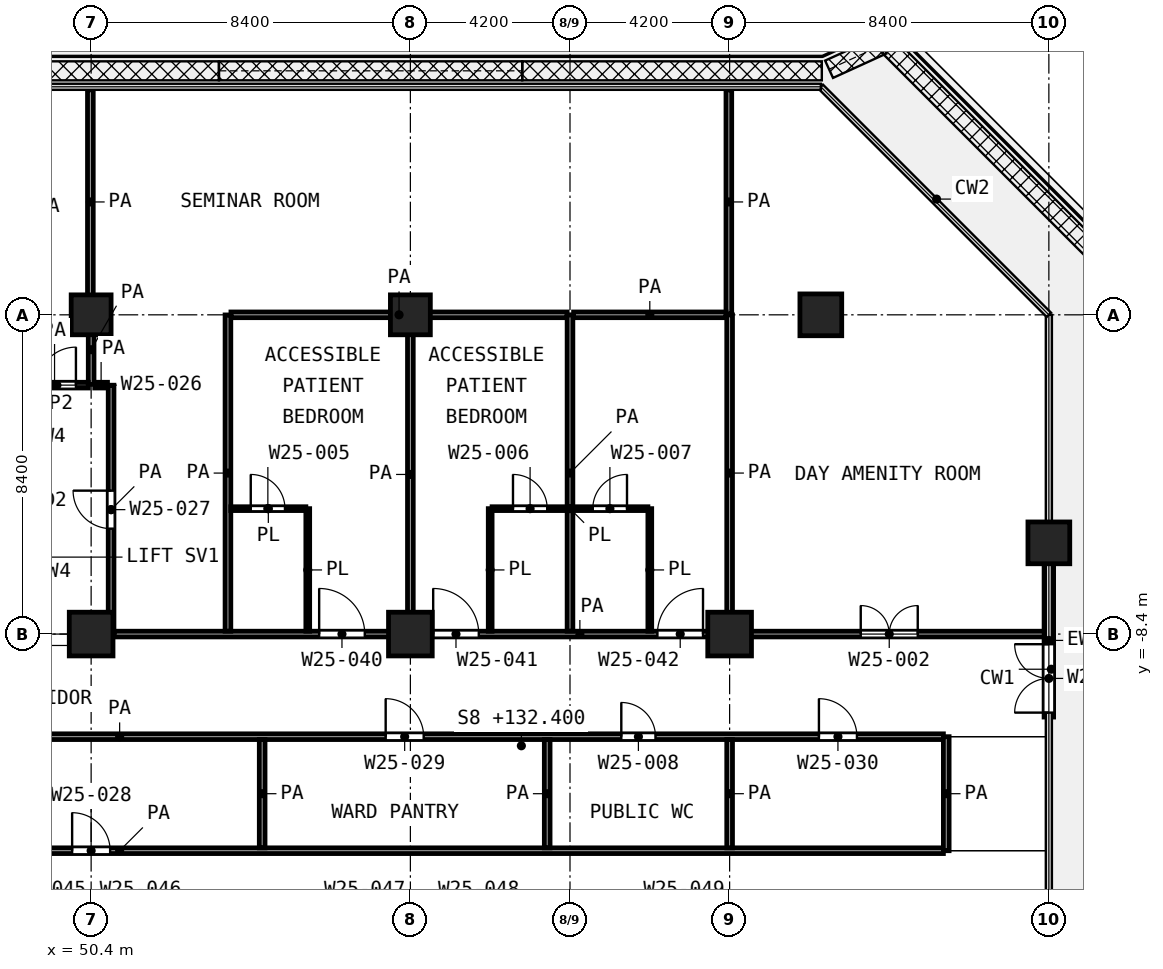
"""IFC4 building model, lengths in metres.
Left out: names, types, materials, properties, quantities, classifications, styles, units other than length and angle.
Written with IfcOpenShell. Run it as: python <this file> out.ifc"""

import sys

from ifc_helpers import new_model, si_unit, direction, frame, frame_2d, origin, origin_2d, place, context, subcontext, project, spatial, rectangle, extrude, element, fill, save


model = new_model("IFC4")
c1 = context("Model", 3, precision=1e-05, world=origin(), true_north=direction((0.0, 1.0)))
c2 = subcontext(c1, "Body", "Model", "MODEL_VIEW")
j1 = project(units=[si_unit("LENGTHUNIT", "METRE"), si_unit("PLANEANGLEUNIT", "RADIAN")], contexts=[c1])
p1 = place(None, origin())
s1 = spatial("IfcSite", under=j1, at=p1, CompositionType="ELEMENT")
p2 = place(p1, origin())
s2 = spatial("IfcBuilding", under=s1, at=p2, CompositionType="ELEMENT")
p3 = place(p2, frame((0.0, 0.0, 132.4)))
s3 = spatial("IfcBuildingStorey", under=s2, at=p3, CompositionType="ELEMENT", Elevation=132.4)
for number, where, z_axis, x_axis in (
    (1, (50.4, 0.0, 0.0), (0.0, 0.0, 1.0), (1.0, 0.0, 0.0)),
    (2, (58.8, 0.0, 0.0), (0.0, 0.0, 1.0), (1.0, 0.0, 0.0)),
):
    element("IfcColumn", number, at=place(p3, frame(where, z_axis=z_axis, x_axis=x_axis)), inside=s3, PredefinedType="COLUMN", context=c2, shape_type="SweptSolid", body=[
        extrude(rectangle(XDim=1.05, YDim=1.05, at=origin_2d()), origin(), (0.0, 0.0, 1.0), 4.2),
    ])
for number, where, z_axis, x_axis in (
    (3, (69.6, 0.0, 0.0), (0.0, 0.0, 1.0), (1.0, 0.0, 0.0)),
    (4, (75.6, -6.0, 0.0), (0.0, 0.0, 1.0), (1.0, 0.0, 0.0)),
):
    element("IfcColumn", number, at=place(p3, frame(where, z_axis=z_axis, x_axis=x_axis)), inside=s3, PredefinedType="COLUMN", context=c2, shape_type="SweptSolid", body=[
        extrude(rectangle(XDim=1.1, YDim=1.1, at=origin_2d()), origin(), (0.0, 0.0, 1.0), 4.2),
    ])
for number, where, z_axis, x_axis in (
    (5, (50.4, -8.4, 0.0), (0.0, 0.0, 1.0), (1.0, 0.0, 0.0)),
    (6, (58.8, -8.4, 0.0), (0.0, 0.0, 1.0), (1.0, 0.0, 0.0)),
    (7, (67.2, -8.4, 0.0), (0.0, 0.0, 1.0), (1.0, 0.0, 0.0)),
):
    element("IfcColumn", number, at=place(p3, frame(where, z_axis=z_axis, x_axis=x_axis)), inside=s3, PredefinedType="COLUMN", context=c2, shape_type="SweptSolid", body=[
        extrude(rectangle(XDim=1.15, YDim=1.15, at=origin_2d()), origin(), (0.0, 0.0, 1.0), 4.2),
    ])
p4 = place(p3, frame((75.6, -10.583, 0.0), z_axis=(0.0, 0.0, 1.0), x_axis=(0.0, 1.0, 0.0)))
e8 = element("IfcWall", 8, at=p4, inside=s3, PredefinedType="SOLIDWALL", context=c2, shape_type="SweptSolid", body=[
    extrude(rectangle(XDim=4.033, YDim=0.25, at=frame_2d((2.017, 0.0))), origin(), (0.0, 0.0, 1.0), 3.48),
])
p5 = place(p4, frame((0.117, 0.0, 0.0)))
e9 = element("IfcOpeningElement", 9, at=p5, cuts=e8, PredefinedType="OPENING", context=c2, shape_type="SweptSolid", body=[
    extrude(rectangle(XDim=1.8, YDim=2.1, at=frame_2d((0.9, 1.05))), frame((0.0, 0.135, 0.0), z_axis=(0.0, -1.0, 0.0), x_axis=(1.0, 0.0, 0.0)), (0.0, 0.0, 1.0), 0.27),
])
p6 = place(p3, frame((54.075, -5.1, 0.0), z_axis=(0.0, 0.0, 1.0), x_axis=(1.0, 0.0, 0.0)))
e10 = element("IfcWall", 10, at=p6, inside=s3, PredefinedType="PARTITIONING", context=c2, shape_type="SweptSolid", body=[
    extrude(rectangle(XDim=1.975, YDim=0.1, at=frame_2d((0.988, 0.0))), origin(), (0.0, 0.0, 1.0), 3.6),
])
p7 = place(p6, frame((0.525, 0.0, 0.0)))
e11 = element("IfcOpeningElement", 11, at=p7, cuts=e10, PredefinedType="OPENING", context=c2, shape_type="SweptSolid", body=[
    extrude(rectangle(XDim=0.9, YDim=2.1, at=frame_2d((0.45, 1.05))), frame((0.0, 0.06, 0.0), z_axis=(0.0, -1.0, 0.0), x_axis=(1.0, 0.0, 0.0)), (0.0, 0.0, 1.0), 0.12),
])
p8 = place(p3, frame((60.95, -5.1, 0.0), z_axis=(0.0, 0.0, 1.0), x_axis=(1.0, 0.0, 0.0)))
e12 = element("IfcWall", 12, at=p8, inside=s3, PredefinedType="PARTITIONING", context=c2, shape_type="SweptSolid", body=[
    extrude(rectangle(XDim=4.1, YDim=0.1, at=frame_2d((2.05, 0.0))), origin(), (0.0, 0.0, 1.0), 3.6),
])
p9 = place(p8, frame((0.55, 0.0, 0.0)))
e13 = element("IfcOpeningElement", 13, at=p9, cuts=e12, PredefinedType="OPENING", context=c2, shape_type="SweptSolid", body=[
    extrude(rectangle(XDim=0.9, YDim=2.1, at=frame_2d((0.45, 1.05))), frame((0.0, 0.06, 0.0), z_axis=(0.0, -1.0, 0.0), x_axis=(1.0, 0.0, 0.0)), (0.0, 0.0, 1.0), 0.12),
])
p10 = place(p8, frame((2.65, 0.0, 0.0)))
e14 = element("IfcOpeningElement", 14, at=p10, cuts=e12, PredefinedType="OPENING", context=c2, shape_type="SweptSolid", body=[
    extrude(rectangle(XDim=0.9, YDim=2.1, at=frame_2d((0.45, 1.05))), frame((0.0, 0.06, 0.0), z_axis=(0.0, -1.0, 0.0), x_axis=(1.0, 0.0, 0.0)), (0.0, 0.0, 1.0), 0.12),
])
for number, where, z_axis, x_axis in (
    (15, (56.1, -8.325, 0.0), (0.0, 0.0, 1.0), (0.0, 1.0, 0.0)),
    (16, (60.9, -8.325, 0.0), (0.0, 0.0, 1.0), (0.0, 1.0, 0.0)),
    (17, (65.1, -8.325, 0.0), (0.0, 0.0, 1.0), (0.0, 1.0, 0.0)),
):
    element("IfcWall", number, at=place(p3, frame(where, z_axis=z_axis, x_axis=x_axis)), inside=s3, PredefinedType="PARTITIONING", context=c2, shape_type="SweptSolid", body=[
        extrude(rectangle(XDim=3.225, YDim=0.1, at=frame_2d((1.612, 0.0))), origin(), (0.0, 0.0, 1.0), 3.6),
    ])
p11 = place(p3, frame((29.475, -14.1, 0.0), z_axis=(0.0, 0.0, 1.0), x_axis=(1.0, 0.0, 0.0)))
e18 = element("IfcWall", 18, at=p11, inside=s3, PredefinedType="PARTITIONING", context=c2, shape_type="SweptSolid", body=[
    extrude(rectangle(XDim=43.35, YDim=0.15, at=frame_2d((21.675, 0.0))), origin(), (0.0, 0.0, 1.0), 3.6),
])
p12 = place(p11, frame((20.425, 0.0, 0.0)))
e19 = element("IfcOpeningElement", 19, at=p12, cuts=e18, PredefinedType="OPENING", context=c2, shape_type="SweptSolid", body=[
    extrude(rectangle(XDim=1.0, YDim=2.1, at=frame_2d((0.5, 1.05))), frame((0.0, 0.085, 0.0), z_axis=(0.0, -1.0, 0.0), x_axis=(1.0, 0.0, 0.0)), (0.0, 0.0, 1.0), 0.17),
])
p13 = place(p3, frame((29.475, -11.1, 0.0), z_axis=(0.0, 0.0, 1.0), x_axis=(1.0, 0.0, 0.0)))
e20 = element("IfcWall", 20, at=p13, inside=s3, PredefinedType="PARTITIONING", context=c2, shape_type="SweptSolid", body=[
    extrude(rectangle(XDim=43.35, YDim=0.15, at=frame_2d((21.675, 0.0))), origin(), (0.0, 0.0, 1.0), 3.6),
])
p14 = place(p13, frame((28.675, 0.0, 0.0)))
e21 = element("IfcOpeningElement", 21, at=p14, cuts=e20, PredefinedType="OPENING", context=c2, shape_type="SweptSolid", body=[
    extrude(rectangle(XDim=1.0, YDim=2.1, at=frame_2d((0.5, 1.05))), frame((0.0, 0.085, 0.0), z_axis=(0.0, -1.0, 0.0), x_axis=(1.0, 0.0, 0.0)), (0.0, 0.0, 1.0), 0.17),
])
p15 = place(p13, frame((34.875, 0.0, 0.0)))
e22 = element("IfcOpeningElement", 22, at=p15, cuts=e20, PredefinedType="OPENING", context=c2, shape_type="SweptSolid", body=[
    extrude(rectangle(XDim=0.9, YDim=2.1, at=frame_2d((0.45, 1.05))), frame((0.0, 0.085, 0.0), z_axis=(0.0, -1.0, 0.0), x_axis=(1.0, 0.0, 0.0)), (0.0, 0.0, 1.0), 0.17),
])
p16 = place(p13, frame((40.075, 0.0, 0.0)))
e23 = element("IfcOpeningElement", 23, at=p16, cuts=e20, PredefinedType="OPENING", context=c2, shape_type="SweptSolid", body=[
    extrude(rectangle(XDim=1.0, YDim=2.1, at=frame_2d((0.5, 1.05))), frame((0.0, 0.085, 0.0), z_axis=(0.0, -1.0, 0.0), x_axis=(1.0, 0.0, 0.0)), (0.0, 0.0, 1.0), 0.17),
])
p17 = place(p13, frame((5.475, 0.0, 0.0)))
e24 = element("IfcOpeningElement", 24, at=p17, cuts=e20, PredefinedType="OPENING", context=c2, shape_type="SweptSolid", body=[
    extrude(rectangle(XDim=1.0, YDim=2.1, at=frame_2d((0.5, 1.05))), frame((0.0, 0.085, 0.0), z_axis=(0.0, -1.0, 0.0), x_axis=(1.0, 0.0, 0.0)), (0.0, 0.0, 1.0), 0.17),
])
p18 = place(p13, frame((12.675, 0.0, 0.0)))
e25 = element("IfcOpeningElement", 25, at=p18, cuts=e20, PredefinedType="OPENING", context=c2, shape_type="SweptSolid", body=[
    extrude(rectangle(XDim=1.0, YDim=2.1, at=frame_2d((0.5, 1.05))), frame((0.0, 0.085, 0.0), z_axis=(0.0, -1.0, 0.0), x_axis=(1.0, 0.0, 0.0)), (0.0, 0.0, 1.0), 0.17),
])
p19 = place(p3, frame((51.0, -8.4, 0.0), z_axis=(0.0, 0.0, 1.0), x_axis=(1.0, 0.0, 0.0)))
e26 = element("IfcWall", 26, at=p19, inside=s3, PredefinedType="PARTITIONING", context=c2, shape_type="SweptSolid", body=[
    extrude(rectangle(XDim=24.52, YDim=0.15, at=frame_2d((12.26, 0.0))), origin(), (0.0, 0.0, 1.0), 3.6),
])
p20 = place(p19, frame((5.4, 0.0, 0.0)))
e27 = element("IfcOpeningElement", 27, at=p20, cuts=e26, PredefinedType="OPENING", context=c2, shape_type="SweptSolid", body=[
    extrude(rectangle(XDim=1.2, YDim=2.1, at=frame_2d((0.6, 1.05))), frame((0.0, 0.085, 0.0), z_axis=(0.0, -1.0, 0.0), x_axis=(1.0, 0.0, 0.0)), (0.0, 0.0, 1.0), 0.17),
])
p21 = place(p19, frame((8.4, 0.0, 0.0)))
e28 = element("IfcOpeningElement", 28, at=p21, cuts=e26, PredefinedType="OPENING", context=c2, shape_type="SweptSolid", body=[
    extrude(rectangle(XDim=1.2, YDim=2.1, at=frame_2d((0.6, 1.05))), frame((0.0, 0.085, 0.0), z_axis=(0.0, -1.0, 0.0), x_axis=(1.0, 0.0, 0.0)), (0.0, 0.0, 1.0), 0.17),
])
p22 = place(p19, frame((14.3, 0.0, 0.0)))
e29 = element("IfcOpeningElement", 29, at=p22, cuts=e26, PredefinedType="OPENING", context=c2, shape_type="SweptSolid", body=[
    extrude(rectangle(XDim=1.2, YDim=2.1, at=frame_2d((0.6, 1.05))), frame((0.0, 0.085, 0.0), z_axis=(0.0, -1.0, 0.0), x_axis=(1.0, 0.0, 0.0)), (0.0, 0.0, 1.0), 0.17),
])
p23 = place(p19, frame((19.65, 0.0, 0.0)))
e30 = element("IfcOpeningElement", 30, at=p23, cuts=e26, PredefinedType="OPENING", context=c2, shape_type="SweptSolid", body=[
    extrude(rectangle(XDim=1.5, YDim=2.1, at=frame_2d((0.75, 1.05))), frame((0.0, 0.085, 0.0), z_axis=(0.0, -1.0, 0.0), x_axis=(1.0, 0.0, 0.0)), (0.0, 0.0, 1.0), 0.17),
])
p24 = place(p3, frame((48.55, -1.85, 0.0), z_axis=(0.0, 0.0, 1.0), x_axis=(1.0, 0.0, 0.0)))
e31 = element("IfcWall", 31, at=p24, inside=s3, PredefinedType="PARTITIONING", context=c2, shape_type="SweptSolid", body=[
    extrude(rectangle(XDim=1.775, YDim=0.15, at=frame_2d((0.887, 0.0))), origin(), (0.0, 0.0, 1.0), 3.6),
])
p25 = place(p24, frame((0.45, 0.0, 0.0)))
e32 = element("IfcOpeningElement", 32, at=p25, cuts=e31, PredefinedType="OPENING", context=c2, shape_type="SweptSolid", body=[
    extrude(rectangle(XDim=1.0, YDim=2.1, at=frame_2d((0.5, 1.05))), frame((0.0, 0.085, 0.0), z_axis=(0.0, -1.0, 0.0), x_axis=(1.0, 0.0, 0.0)), (0.0, 0.0, 1.0), 0.17),
])
p26 = place(p3, frame((50.495, -1.85, 0.0), z_axis=(0.0, 0.0, 1.0), x_axis=(1.0, 0.0, 0.0)))
e33 = element("IfcWall", 33, at=p26, inside=s3, PredefinedType="PARTITIONING", context=c2, shape_type="SweptSolid", body=[
    extrude(rectangle(XDim=0.335, YDim=0.15, at=frame_2d((0.167, 0.0))), origin(), (0.0, 0.0, 1.0), 3.6),
])
p27 = place(p3, frame((54.079, 0.0, 0.0), z_axis=(0.0, 0.0, 1.0), x_axis=(1.0, 0.0, 0.0)))
e34 = element("IfcWall", 34, at=p27, inside=s3, PredefinedType="PARTITIONING", context=c2, shape_type="SweptSolid", body=[
    extrude(rectangle(XDim=8.846, YDim=0.15, at=frame_2d((4.423, 0.0))), origin(), (0.0, 0.0, 1.0), 3.6),
])
p28 = place(p3, frame((63.095, 0.0, 0.0), z_axis=(0.0, 0.0, 1.0), x_axis=(1.0, 0.0, 0.0)))
e35 = element("IfcWall", 35, at=p28, inside=s3, PredefinedType="PARTITIONING", context=c2, shape_type="SweptSolid", body=[
    extrude(rectangle(XDim=4.01, YDim=0.15, at=frame_2d((2.005, 0.0))), origin(), (0.0, 0.0, 1.0), 3.6),
])
p29 = place(p3, frame((50.38, 0.02, 0.0), z_axis=(0.0, 0.0, 1.0), x_axis=(0.0, 1.0, 0.0)))
e36 = element("IfcWall", 36, at=p29, inside=s3, PredefinedType="PARTITIONING", context=c2, shape_type="SweptSolid", body=[
    extrude(rectangle(XDim=5.9, YDim=0.15, at=frame_2d((2.95, 0.0))), origin(), (0.0, 0.0, 1.0), 3.6),
])
p30 = place(p3, frame((50.4, -1.83, 0.0), z_axis=(0.0, 0.0, 1.0), x_axis=(0.0, 1.0, 0.0)))
e37 = element("IfcWall", 37, at=p30, inside=s3, PredefinedType="PARTITIONING", context=c2, shape_type="SweptSolid", body=[
    extrude(rectangle(XDim=1.825, YDim=0.15, at=frame_2d((0.913, 0.0))), origin(), (0.0, 0.0, 1.0), 3.6),
])
p31 = place(p3, frame((50.925, -8.4, 0.0), z_axis=(0.0, 0.0, 1.0), x_axis=(0.0, 1.0, 0.0)))
e38 = element("IfcWall", 38, at=p31, inside=s3, PredefinedType="PARTITIONING", context=c2, shape_type="SweptSolid", body=[
    extrude(rectangle(XDim=6.548, YDim=0.15, at=frame_2d((3.274, 0.0))), origin(), (0.0, 0.0, 1.0), 3.6),
])
p32 = place(p31, frame((2.774, 0.0, 0.0)))
e39 = element("IfcOpeningElement", 39, at=p32, cuts=e38, PredefinedType="OPENING", context=c2, shape_type="SweptSolid", body=[
    extrude(rectangle(XDim=1.0, YDim=2.1, at=frame_2d((0.5, 1.05))), frame((0.0, 0.085, 0.0), z_axis=(0.0, -1.0, 0.0), x_axis=(1.0, 0.0, 0.0)), (0.0, 0.0, 1.0), 0.17),
])
p33 = place(p3, frame((54.0, -8.325, 0.0), z_axis=(0.0, 0.0, 1.0), x_axis=(0.0, 1.0, 0.0)))
e40 = element("IfcWall", 40, at=p33, inside=s3, PredefinedType="PARTITIONING", context=c2, shape_type="SweptSolid", body=[
    extrude(rectangle(XDim=8.322, YDim=0.15, at=frame_2d((4.161, 0.0))), origin(), (0.0, 0.0, 1.0), 3.6),
])
p34 = place(p3, frame((54.9, -14.025, 0.0), z_axis=(0.0, 0.0, 1.0), x_axis=(0.0, 1.0, 0.0)))
e41 = element("IfcWall", 41, at=p34, inside=s3, PredefinedType="PARTITIONING", context=c2, shape_type="SweptSolid", body=[
    extrude(rectangle(XDim=2.85, YDim=0.15, at=frame_2d((1.425, 0.0))), origin(), (0.0, 0.0, 1.0), 3.6),
])
p35 = place(p3, frame((58.8, -8.325, 0.0), z_axis=(0.0, 0.0, 1.0), x_axis=(0.0, 1.0, 0.0)))
e42 = element("IfcWall", 42, at=p35, inside=s3, PredefinedType="PARTITIONING", context=c2, shape_type="SweptSolid", body=[
    extrude(rectangle(XDim=8.25, YDim=0.15, at=frame_2d((4.125, 0.0))), origin(), (0.0, 0.0, 1.0), 3.6),
])
p36 = place(p3, frame((62.4, -14.025, 0.0), z_axis=(0.0, 0.0, 1.0), x_axis=(0.0, 1.0, 0.0)))
e43 = element("IfcWall", 43, at=p36, inside=s3, PredefinedType="PARTITIONING", context=c2, shape_type="SweptSolid", body=[
    extrude(rectangle(XDim=2.85, YDim=0.15, at=frame_2d((1.425, 0.0))), origin(), (0.0, 0.0, 1.0), 3.6),
])
p37 = place(p3, frame((63.0, -8.325, 0.0), z_axis=(0.0, 0.0, 1.0), x_axis=(0.0, 1.0, 0.0)))
e44 = element("IfcWall", 44, at=p37, inside=s3, PredefinedType="PARTITIONING", context=c2, shape_type="SweptSolid", body=[
    extrude(rectangle(XDim=8.325, YDim=0.15, at=frame_2d((4.163, 0.0))), origin(), (0.0, 0.0, 1.0), 3.6),
])
p38 = place(p3, frame((67.18, 0.02, 0.0), z_axis=(0.0, 0.0, 1.0), x_axis=(0.0, 1.0, 0.0)))
e45 = element("IfcWall", 45, at=p38, inside=s3, PredefinedType="PARTITIONING", context=c2, shape_type="SweptSolid", body=[
    extrude(rectangle(XDim=5.9, YDim=0.15, at=frame_2d((2.95, 0.0))), origin(), (0.0, 0.0, 1.0), 3.6),
])
p39 = place(p3, frame((67.2, -14.025, 0.0), z_axis=(0.0, 0.0, 1.0), x_axis=(0.0, 1.0, 0.0)))
e46 = element("IfcWall", 46, at=p39, inside=s3, PredefinedType="PARTITIONING", context=c2, shape_type="SweptSolid", body=[
    extrude(rectangle(XDim=2.85, YDim=0.15, at=frame_2d((1.425, 0.0))), origin(), (0.0, 0.0, 1.0), 3.6),
])
p40 = place(p3, frame((67.2, -8.325, 0.0), z_axis=(0.0, 0.0, 1.0), x_axis=(0.0, 1.0, 0.0)))
e47 = element("IfcWall", 47, at=p40, inside=s3, PredefinedType="PARTITIONING", context=c2, shape_type="SweptSolid", body=[
    extrude(rectangle(XDim=8.323, YDim=0.15, at=frame_2d((4.162, 0.0))), origin(), (0.0, 0.0, 1.0), 3.6),
])
p41 = place(p3, frame((72.9, -14.1, 0.0), z_axis=(0.0, 0.0, 1.0), x_axis=(0.0, 1.0, 0.0)))
e48 = element("IfcWall", 48, at=p41, inside=s3, PredefinedType="PARTITIONING", context=c2, shape_type="SweptSolid", body=[
    extrude(rectangle(XDim=3.0, YDim=0.15, at=frame_2d((1.5, 0.0))), origin(), (0.0, 0.0, 1.0), 3.6),
])
p42 = place(p5, origin())
e49 = element("IfcDoor", 49, at=p42, inside=s3, OperationType="DOUBLE_DOOR_SINGLE_SWING", PredefinedType="DOOR", context=c2, shape_type="SweptSolid", body=[
    extrude(rectangle(XDim=1.8, YDim=2.1, at=frame_2d((0.9, 1.05))), frame((0.0, 0.025, 0.0), z_axis=(0.0, -1.0, 0.0), x_axis=(1.0, 0.0, 0.0)), (0.0, 0.0, 1.0), 0.05),
])
fill(e9, e49)
p43 = place(p25, origin())
e50 = element("IfcDoor", 50, at=p43, inside=s3, OperationType="SINGLE_SWING_RIGHT", PredefinedType="DOOR", context=c2, shape_type="SweptSolid", body=[
    extrude(rectangle(XDim=1.0, YDim=2.1, at=frame_2d((0.5, 1.05))), frame((0.0, 0.025, 0.0), z_axis=(0.0, -1.0, 0.0), x_axis=(1.0, 0.0, 0.0)), (0.0, 0.0, 1.0), 0.05),
])
fill(e32, e50)
p44 = place(p32, origin())
e51 = element("IfcDoor", 51, at=p44, inside=s3, OperationType="SINGLE_SWING_RIGHT", PredefinedType="DOOR", context=c2, shape_type="SweptSolid", body=[
    extrude(rectangle(XDim=1.0, YDim=2.1, at=frame_2d((0.5, 1.05))), frame((0.0, 0.025, 0.0), z_axis=(0.0, -1.0, 0.0), x_axis=(1.0, 0.0, 0.0)), (0.0, 0.0, 1.0), 0.05),
])
fill(e39, e51)
p45 = place(p20, origin())
e52 = element("IfcDoor", 52, at=p45, inside=s3, OperationType="SINGLE_SWING_LEFT", PredefinedType="DOOR", context=c2, shape_type="SweptSolid", body=[
    extrude(rectangle(XDim=1.2, YDim=2.1, at=frame_2d((0.6, 1.05))), frame((0.0, 0.025, 0.0), z_axis=(0.0, -1.0, 0.0), x_axis=(1.0, 0.0, 0.0)), (0.0, 0.0, 1.0), 0.05),
])
fill(e27, e52)
p46 = place(p7, origin())
e53 = element("IfcDoor", 53, at=p46, inside=s3, OperationType="SINGLE_SWING_LEFT", PredefinedType="DOOR", context=c2, shape_type="SweptSolid", body=[
    extrude(rectangle(XDim=0.9, YDim=2.1, at=frame_2d((0.45, 1.05))), frame((0.0, 0.025, 0.0), z_axis=(0.0, -1.0, 0.0), x_axis=(1.0, 0.0, 0.0)), (0.0, 0.0, 1.0), 0.05),
])
fill(e11, e53)
p47 = place(p21, origin())
e54 = element("IfcDoor", 54, at=p47, inside=s3, OperationType="SINGLE_SWING_LEFT", PredefinedType="DOOR", context=c2, shape_type="SweptSolid", body=[
    extrude(rectangle(XDim=1.2, YDim=2.1, at=frame_2d((0.6, 1.05))), frame((0.0, 0.025, 0.0), z_axis=(0.0, -1.0, 0.0), x_axis=(1.0, 0.0, 0.0)), (0.0, 0.0, 1.0), 0.05),
])
fill(e28, e54)
p48 = place(p9, origin())
e55 = element("IfcDoor", 55, at=p48, inside=s3, OperationType="SINGLE_SWING_LEFT", PredefinedType="DOOR", context=c2, shape_type="SweptSolid", body=[
    extrude(rectangle(XDim=0.9, YDim=2.1, at=frame_2d((0.45, 1.05))), frame((0.0, 0.025, 0.0), z_axis=(0.0, -1.0, 0.0), x_axis=(1.0, 0.0, 0.0)), (0.0, 0.0, 1.0), 0.05),
])
fill(e13, e55)
p49 = place(p22, origin())
e56 = element("IfcDoor", 56, at=p49, inside=s3, OperationType="SINGLE_SWING_RIGHT", PredefinedType="DOOR", context=c2, shape_type="SweptSolid", body=[
    extrude(rectangle(XDim=1.2, YDim=2.1, at=frame_2d((0.6, 1.05))), frame((0.0, 0.025, 0.0), z_axis=(0.0, -1.0, 0.0), x_axis=(1.0, 0.0, 0.0)), (0.0, 0.0, 1.0), 0.05),
])
fill(e29, e56)
p50 = place(p10, origin())
e57 = element("IfcDoor", 57, at=p50, inside=s3, OperationType="SINGLE_SWING_RIGHT", PredefinedType="DOOR", context=c2, shape_type="SweptSolid", body=[
    extrude(rectangle(XDim=0.9, YDim=2.1, at=frame_2d((0.45, 1.05))), frame((0.0, 0.025, 0.0), z_axis=(0.0, -1.0, 0.0), x_axis=(1.0, 0.0, 0.0)), (0.0, 0.0, 1.0), 0.05),
])
fill(e14, e57)
p51 = place(p23, origin())
e58 = element("IfcDoor", 58, at=p51, inside=s3, OperationType="DOUBLE_DOOR_SINGLE_SWING", PredefinedType="DOOR", context=c2, shape_type="SweptSolid", body=[
    extrude(rectangle(XDim=1.5, YDim=2.1, at=frame_2d((0.75, 1.05))), frame((0.0, 0.025, 0.0), z_axis=(0.0, -1.0, 0.0), x_axis=(1.0, 0.0, 0.0)), (0.0, 0.0, 1.0), 0.05),
])
fill(e30, e58)
p52 = place(p12, origin())
e59 = element("IfcDoor", 59, at=p52, inside=s3, OperationType="SINGLE_SWING_LEFT", PredefinedType="DOOR", context=c2, shape_type="SweptSolid", body=[
    extrude(rectangle(XDim=1.0, YDim=2.1, at=frame_2d((0.5, 1.05))), frame((0.0, 0.025, 0.0), z_axis=(0.0, -1.0, 0.0), x_axis=(1.0, 0.0, 0.0)), (0.0, 0.0, 1.0), 0.05),
])
fill(e19, e59)
p53 = place(p14, origin())
e60 = element("IfcDoor", 60, at=p53, inside=s3, OperationType="SINGLE_SWING_LEFT", PredefinedType="DOOR", context=c2, shape_type="SweptSolid", body=[
    extrude(rectangle(XDim=1.0, YDim=2.1, at=frame_2d((0.5, 1.05))), frame((0.0, 0.025, 0.0), z_axis=(0.0, -1.0, 0.0), x_axis=(1.0, 0.0, 0.0)), (0.0, 0.0, 1.0), 0.05),
])
fill(e21, e60)
p54 = place(p15, origin())
e61 = element("IfcDoor", 61, at=p54, inside=s3, OperationType="SINGLE_SWING_LEFT", PredefinedType="DOOR", context=c2, shape_type="SweptSolid", body=[
    extrude(rectangle(XDim=0.9, YDim=2.1, at=frame_2d((0.45, 1.05))), frame((0.0, 0.025, 0.0), z_axis=(0.0, -1.0, 0.0), x_axis=(1.0, 0.0, 0.0)), (0.0, 0.0, 1.0), 0.05),
])
fill(e22, e61)
p55 = place(p16, origin())
e62 = element("IfcDoor", 62, at=p55, inside=s3, OperationType="SINGLE_SWING_LEFT", PredefinedType="DOOR", context=c2, shape_type="SweptSolid", body=[
    extrude(rectangle(XDim=1.0, YDim=2.1, at=frame_2d((0.5, 1.05))), frame((0.0, 0.025, 0.0), z_axis=(0.0, -1.0, 0.0), x_axis=(1.0, 0.0, 0.0)), (0.0, 0.0, 1.0), 0.05),
])
fill(e23, e62)
save(model, sys.argv[1])
